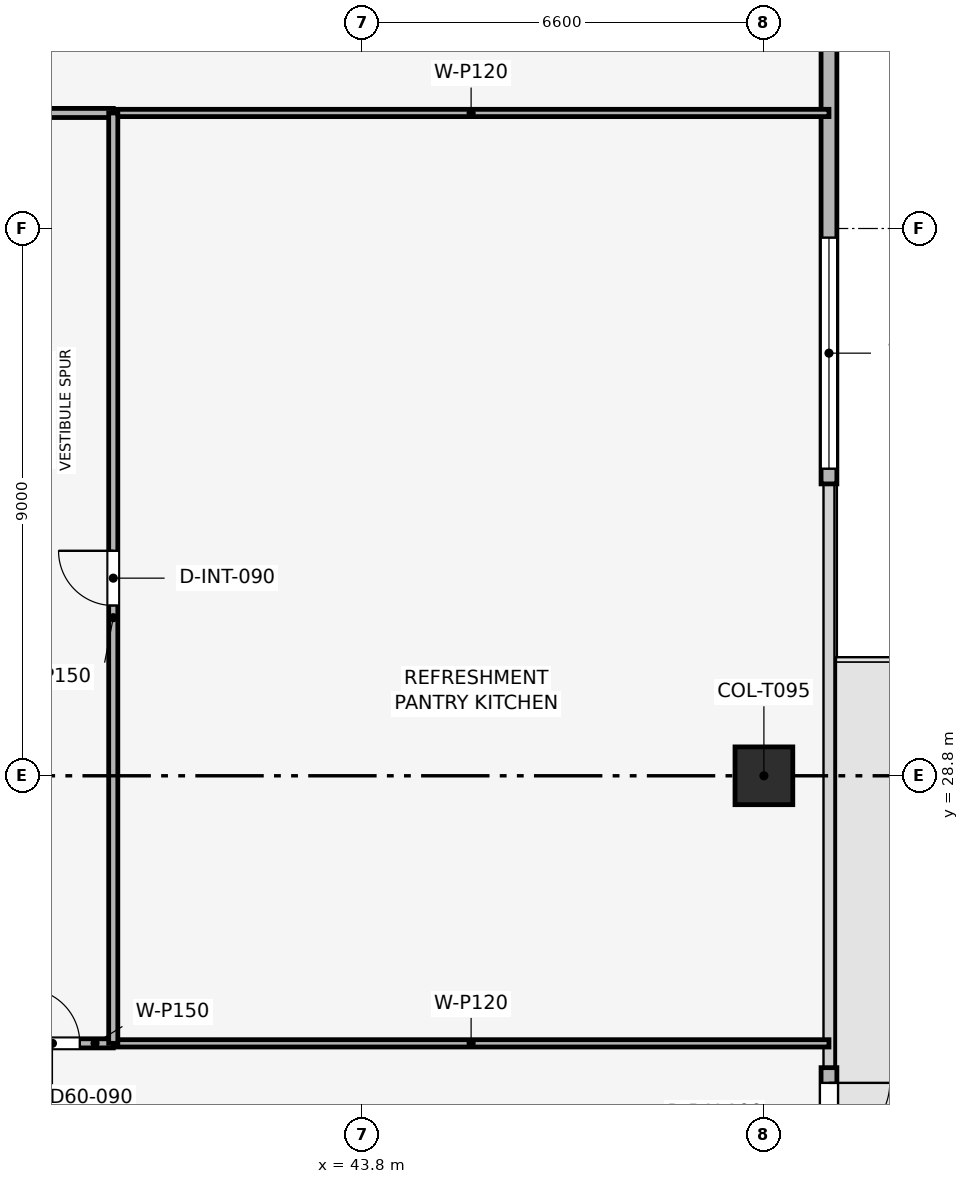
"""IFC4 building model, lengths in metres.
Left out: names, types, materials, properties, quantities, classifications, styles, units other than length and angle.
Written with IfcOpenShell. Run it as: python <this file> out.ifc"""

import sys

from ifc_helpers import new_model, si_unit, direction, frame, frame_2d, origin, origin_2d, place, context, subcontext, project, spatial, rectangle, extrude, element, fill, save


model = new_model("IFC4")
c1 = context("Model", 3, precision=1e-05, world=origin(), true_north=direction((0.0, 1.0)))
c2 = subcontext(c1, "Body", "Model", "MODEL_VIEW")
j1 = project(units=[si_unit("LENGTHUNIT", "METRE"), si_unit("PLANEANGLEUNIT", "RADIAN")], contexts=[c1])
p1 = place(None, origin())
s1 = spatial("IfcSite", under=j1, at=p1, CompositionType="ELEMENT")
p2 = place(p1, origin())
s2 = spatial("IfcBuilding", under=s1, at=p2, CompositionType="ELEMENT")
p3 = place(p2, frame((0.0, 0.0, 314.25)))
s3 = spatial("IfcBuildingStorey", under=s2, at=p3, CompositionType="ELEMENT", Elevation=314.25)
p4 = place(p3, frame((50.4, 28.8, 0.003), z_axis=(0.0, 0.0, 1.0), x_axis=(1.0, 0.0, 0.0)))
e1 = element("IfcColumn", 1, at=p4, inside=s3, PredefinedType="COLUMN", context=c2, shape_type="SweptSolid", body=[
    extrude(rectangle(XDim=0.95, YDim=0.95, at=origin_2d()), origin(), (0.0, 0.0, 1.0), 3.504),
])
p5 = place(p3, frame((51.47, 45.3, 0.0), z_axis=(0.0, 0.0, 1.0), x_axis=(0.0, -1.0, 0.0)))
e2 = element("IfcWall", 2, at=p5, inside=s3, PredefinedType="SOLIDWALL", context=c2, shape_type="SweptSolid", body=[
    extrude(rectangle(XDim=11.7, YDim=0.26, at=frame_2d((5.85, 0.0))), origin(), (0.0, 0.0, 1.0), 3.51),
])
p6 = place(p5, frame((7.65, 0.0, 0.9)))
e3 = element("IfcOpeningElement", 3, at=p6, cuts=e2, PredefinedType="OPENING", context=c2, shape_type="SweptSolid", body=[
    extrude(rectangle(XDim=3.8, YDim=1.9, at=frame_2d((1.9, 0.95))), frame((0.0, 0.14, 0.0), z_axis=(0.0, -1.0, 0.0), x_axis=(1.0, 0.0, 0.0)), (0.0, 0.0, 1.0), 0.28),
])
p7 = place(p3, frame((51.47, 24.0, 0.0), z_axis=(0.0, 0.0, 1.0), x_axis=(0.0, -1.0, 0.0)))
e4 = element("IfcWall", 4, at=p7, inside=s3, PredefinedType="SOLIDWALL", context=c2, shape_type="SweptSolid", body=[
    extrude(rectangle(XDim=11.7, YDim=0.26, at=frame_2d((5.85, 0.0))), origin(), (0.0, 0.0, 1.0), 3.51),
])
p8 = place(p7, frame((0.25, 0.0, 0.0)))
e5 = element("IfcOpeningElement", 5, at=p8, cuts=e4, PredefinedType="OPENING", context=c2, shape_type="SweptSolid", body=[
    extrude(rectangle(XDim=1.0, YDim=2.2, at=frame_2d((0.5, 1.1))), frame((0.0, 0.14, 0.0), z_axis=(0.0, -1.0, 0.0), x_axis=(1.0, 0.0, 0.0)), (0.0, 0.0, 1.0), 0.28),
])
p9 = place(p3, frame((37.8, 24.4, 0.0), z_axis=(0.0, 0.0, 1.0), x_axis=(1.0, 0.0, 0.0)))
e6 = element("IfcWall", 6, at=p9, inside=s3, PredefinedType="PARTITIONING", context=c2, shape_type="SweptSolid", body=[
    extrude(rectangle(XDim=1.9, YDim=0.15, at=frame_2d((0.95, 0.0))), origin(), (0.0, 0.0, 1.0), 3.51),
])
p10 = place(p9, frame((0.45, 0.0, 0.0)))
e7 = element("IfcOpeningElement", 7, at=p10, cuts=e6, PredefinedType="OPENING", context=c2, shape_type="SweptSolid", body=[
    extrude(rectangle(XDim=0.9, YDim=2.1, at=frame_2d((0.45, 1.05))), frame((0.0, 0.085, 0.0), z_axis=(0.0, -1.0, 0.0), x_axis=(1.0, 0.0, 0.0)), (0.0, 0.0, 1.0), 0.17),
])
p11 = place(p3, frame((39.7, 24.4, 0.0), z_axis=(0.0, 0.0, 1.0), x_axis=(1.0, 0.0, 0.0)))
e8 = element("IfcWall", 8, at=p11, inside=s3, PredefinedType="PARTITIONING", context=c2, shape_type="SweptSolid", body=[
    extrude(rectangle(XDim=11.77, YDim=0.12, at=frame_2d((5.885, 0.0))), origin(), (0.0, 0.0, 1.0), 3.135),
])
p12 = place(p3, frame((39.7, 39.7, 0.0), z_axis=(0.0, 0.0, 1.0), x_axis=(1.0, 0.0, 0.0)))
e9 = element("IfcWall", 9, at=p12, inside=s3, PredefinedType="PARTITIONING", context=c2, shape_type="SweptSolid", body=[
    extrude(rectangle(XDim=11.77, YDim=0.12, at=frame_2d((5.885, 0.0))), origin(), (0.0, 0.0, 1.0), 3.095),
])
p13 = place(p3, frame((17.9, 39.7, 0.0), z_axis=(0.0, 0.0, 1.0), x_axis=(1.0, 0.0, 0.0)))
e10 = element("IfcWall", 10, at=p13, inside=s3, PredefinedType="PARTITIONING", context=c2, shape_type="SweptSolid", body=[
    extrude(rectangle(XDim=21.8, YDim=0.15, at=frame_2d((10.9, 0.0))), origin(), (0.0, 0.0, 1.0), 3.095),
])
p14 = place(p13, frame((0.7, 0.0, 0.0)))
e11 = element("IfcOpeningElement", 11, at=p14, cuts=e10, PredefinedType="OPENING", context=c2, shape_type="SweptSolid", body=[
    extrude(rectangle(XDim=0.9, YDim=2.1, at=frame_2d((0.45, 1.05))), frame((0.0, 0.085, 0.0), z_axis=(0.0, -1.0, 0.0), x_axis=(1.0, 0.0, 0.0)), (0.0, 0.0, 1.0), 0.17),
])
p15 = place(p13, frame((6.053, 0.0, 0.0)))
e12 = element("IfcOpeningElement", 12, at=p15, cuts=e10, PredefinedType="OPENING", context=c2, shape_type="SweptSolid", body=[
    extrude(rectangle(XDim=0.9, YDim=2.1, at=frame_2d((0.45, 1.05))), frame((0.0, 0.085, 0.0), z_axis=(0.0, -1.0, 0.0), x_axis=(1.0, 0.0, 0.0)), (0.0, 0.0, 1.0), 0.17),
])
p16 = place(p13, frame((15.803, 0.0, 0.0)))
e13 = element("IfcOpeningElement", 13, at=p16, cuts=e10, PredefinedType="OPENING", context=c2, shape_type="SweptSolid", body=[
    extrude(rectangle(XDim=0.9, YDim=2.1, at=frame_2d((0.45, 1.05))), frame((0.0, 0.085, 0.0), z_axis=(0.0, -1.0, 0.0), x_axis=(1.0, 0.0, 0.0)), (0.0, 0.0, 1.0), 0.17),
])
p17 = place(p3, frame((39.7, 24.4, 0.0), z_axis=(0.0, 0.0, 1.0), x_axis=(0.0, 1.0, 0.0)))
e14 = element("IfcWall", 14, at=p17, inside=s3, PredefinedType="PARTITIONING", context=c2, shape_type="SweptSolid", body=[
    extrude(rectangle(XDim=15.3, YDim=0.15, at=frame_2d((7.65, 0.0))), origin(), (0.0, 0.0, 1.0), 3.095),
])
p18 = place(p17, frame((7.2, 0.0, 0.0)))
e15 = element("IfcOpeningElement", 15, at=p18, cuts=e14, PredefinedType="OPENING", context=c2, shape_type="SweptSolid", body=[
    extrude(rectangle(XDim=0.9, YDim=2.1, at=frame_2d((0.45, 1.05))), frame((0.0, 0.085, 0.0), z_axis=(0.0, -1.0, 0.0), x_axis=(1.0, 0.0, 0.0)), (0.0, 0.0, 1.0), 0.17),
])
p19 = place(p8, origin())
e16 = element("IfcDoor", 16, at=p19, inside=s3, OperationType="SINGLE_SWING_LEFT", PredefinedType="DOOR", context=c2, shape_type="SweptSolid", body=[
    extrude(rectangle(XDim=1.0, YDim=2.2, at=frame_2d((0.5, 1.1))), frame((0.0, 0.025, 0.0), z_axis=(0.0, -1.0, 0.0), x_axis=(1.0, 0.0, 0.0)), (0.0, 0.0, 1.0), 0.05),
])
fill(e5, e16)
p20 = place(p6, origin())
e17 = element("IfcWindow", 17, at=p20, inside=s3, PartitioningType="SINGLE_PANEL", PredefinedType="WINDOW", context=c2, shape_type="SweptSolid", body=[
    extrude(rectangle(XDim=3.8, YDim=1.9, at=frame_2d((1.9, 0.95))), frame((0.0, 0.03, 0.0), z_axis=(0.0, -1.0, 0.0), x_axis=(1.0, 0.0, 0.0)), (0.0, 0.0, 1.0), 0.06),
])
fill(e3, e17)
p21 = place(p10, origin())
e18 = element("IfcDoor", 18, at=p21, inside=s3, OperationType="SINGLE_SWING_LEFT", PredefinedType="DOOR", context=c2, shape_type="SweptSolid", body=[
    extrude(rectangle(XDim=0.9, YDim=2.1, at=frame_2d((0.45, 1.05))), frame((0.0, 0.025, 0.0), z_axis=(0.0, -1.0, 0.0), x_axis=(1.0, 0.0, 0.0)), (0.0, 0.0, 1.0), 0.05),
])
fill(e7, e18)
p22 = place(p18, origin())
e19 = element("IfcDoor", 19, at=p22, inside=s3, OperationType="SINGLE_SWING_RIGHT", PredefinedType="DOOR", context=c2, shape_type="SweptSolid", body=[
    extrude(rectangle(XDim=0.9, YDim=2.1, at=frame_2d((0.45, 1.05))), frame((0.0, 0.025, 0.0), z_axis=(0.0, -1.0, 0.0), x_axis=(1.0, 0.0, 0.0)), (0.0, 0.0, 1.0), 0.05),
])
fill(e15, e19)
save(model, sys.argv[1])
